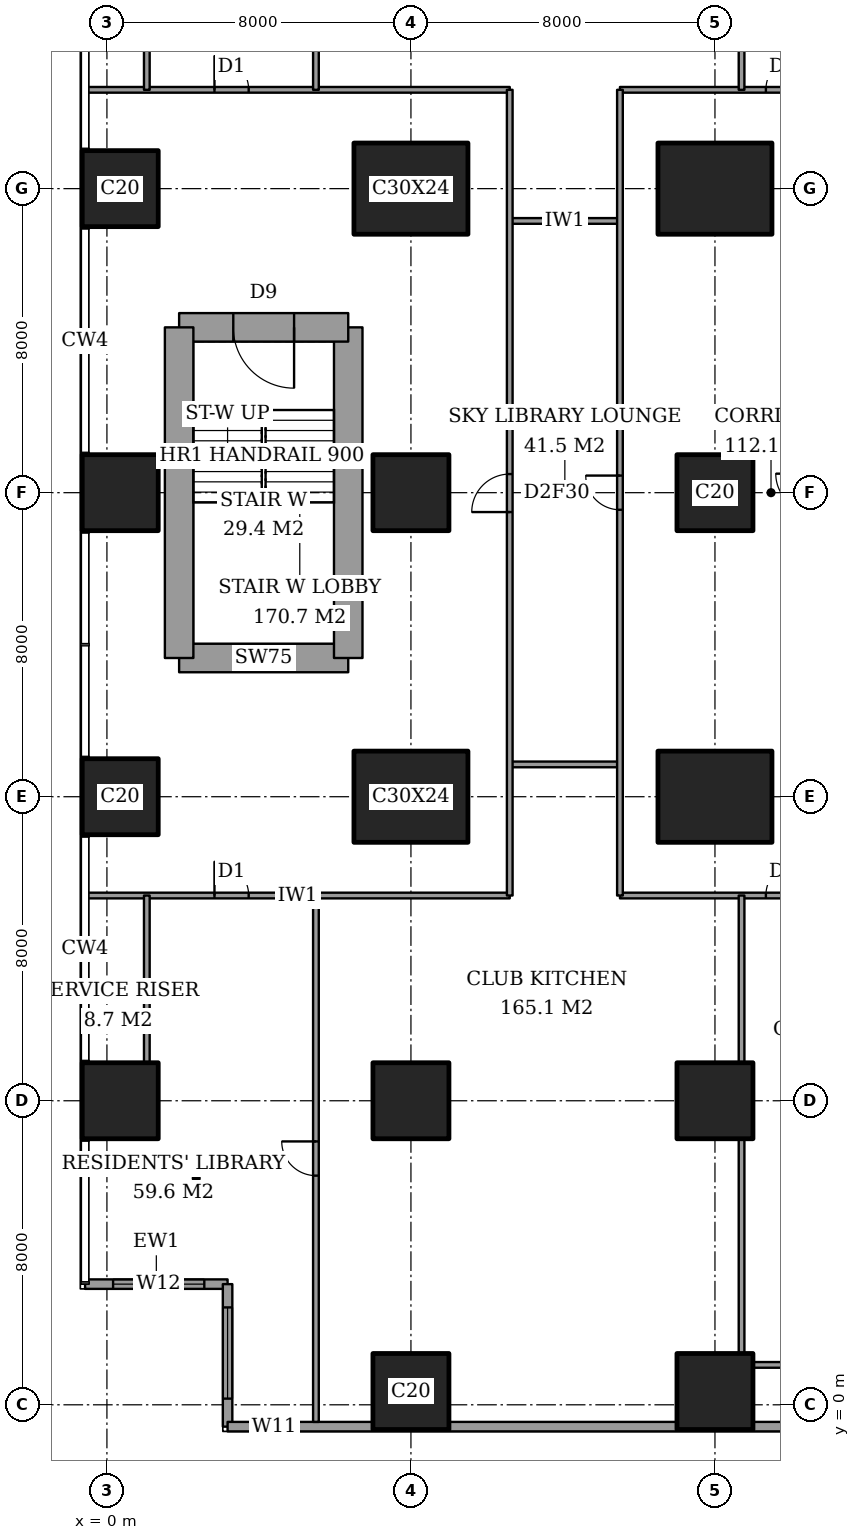
"""IFC4 building model, lengths in metres.
Left out: names, types, materials, properties, quantities, classifications, styles, units other than length and angle.
Written with IfcOpenShell. Run it as: python <this file> out.ifc"""

import sys

from ifc_helpers import new_model, si_unit, direction, frame, frame_2d, origin, origin_2d, place, context, subcontext, project, spatial, rectangle, extrude, element, fill, save


model = new_model("IFC4")
c1 = context("Model", 3, precision=1e-05, world=origin(), true_north=direction((0.0, 1.0)))
c2 = subcontext(c1, "Body", "Model", "MODEL_VIEW")
j1 = project(units=[si_unit("LENGTHUNIT", "METRE"), si_unit("PLANEANGLEUNIT", "RADIAN")], contexts=[c1])
p1 = place(None, origin())
s1 = spatial("IfcSite", under=j1, at=p1, CompositionType="ELEMENT")
p2 = place(p1, origin())
s2 = spatial("IfcBuilding", under=s1, at=p2, CompositionType="ELEMENT")
p3 = place(p2, frame((0.0, 0.0, 132.2)))
s3 = spatial("IfcBuildingStorey", under=s2, at=p3, CompositionType="ELEMENT", Elevation=132.2)
for number, where, z_axis, x_axis in (
    (1, (0.35, 8.0, 0.0), (0.0, 0.0, 1.0), (1.0, 0.0, 0.0)),
    (2, (0.35, 16.0, 0.0), (0.0, 0.0, 1.0), (1.0, 0.0, 0.0)),
    (3, (0.35, 24.0, 0.0), (0.0, 0.0, 1.0), (1.0, 0.0, 0.0)),
    (4, (0.35, 32.0, 0.0), (0.0, 0.0, 1.0), (1.0, 0.0, 0.0)),
    (5, (8.0, 0.35, 0.0), (0.0, 0.0, 1.0), (1.0, 0.0, 0.0)),
    (6, (8.0, 8.0, 0.0), (0.0, 0.0, 1.0), (1.0, 0.0, 0.0)),
):
    element("IfcColumn", number, at=place(p3, frame(where, z_axis=z_axis, x_axis=x_axis)), inside=s3, PredefinedType="COLUMN", context=c2, shape_type="SweptSolid", body=[
        extrude(rectangle(XDim=2.0, YDim=2.0, at=origin_2d()), origin(), (0.0, 0.0, 1.0), 3.6),
    ])
p4 = place(p3, frame((8.0, 16.0, 0.0), z_axis=(0.0, 0.0, 1.0), x_axis=(1.0, 0.0, 0.0)))
e7 = element("IfcColumn", 7, at=p4, inside=s3, PredefinedType="COLUMN", context=c2, shape_type="SweptSolid", body=[
    extrude(rectangle(XDim=3.0, YDim=2.4, at=origin_2d()), origin(), (0.0, 0.0, 1.0), 3.6),
])
p5 = place(p3, frame((8.0, 24.0, 0.0), z_axis=(0.0, 0.0, 1.0), x_axis=(1.0, 0.0, 0.0)))
e8 = element("IfcColumn", 8, at=p5, inside=s3, PredefinedType="COLUMN", context=c2, shape_type="SweptSolid", body=[
    extrude(rectangle(XDim=2.0, YDim=2.0, at=origin_2d()), origin(), (0.0, 0.0, 1.0), 3.6),
])
p6 = place(p3, frame((8.0, 32.0, 0.0), z_axis=(0.0, 0.0, 1.0), x_axis=(1.0, 0.0, 0.0)))
e9 = element("IfcColumn", 9, at=p6, inside=s3, PredefinedType="COLUMN", context=c2, shape_type="SweptSolid", body=[
    extrude(rectangle(XDim=3.0, YDim=2.4, at=origin_2d()), origin(), (0.0, 0.0, 1.0), 3.6),
])
for number, where, z_axis, x_axis in (
    (10, (16.0, 0.35, 0.0), (0.0, 0.0, 1.0), (1.0, 0.0, 0.0)),
    (11, (16.0, 8.0, 0.0), (0.0, 0.0, 1.0), (1.0, 0.0, 0.0)),
):
    element("IfcColumn", number, at=place(p3, frame(where, z_axis=z_axis, x_axis=x_axis)), inside=s3, PredefinedType="COLUMN", context=c2, shape_type="SweptSolid", body=[
        extrude(rectangle(XDim=2.0, YDim=2.0, at=origin_2d()), origin(), (0.0, 0.0, 1.0), 3.6),
    ])
p7 = place(p3, frame((16.0, 16.0, 0.0), z_axis=(0.0, 0.0, 1.0), x_axis=(1.0, 0.0, 0.0)))
e12 = element("IfcColumn", 12, at=p7, inside=s3, PredefinedType="COLUMN", context=c2, shape_type="SweptSolid", body=[
    extrude(rectangle(XDim=3.0, YDim=2.4, at=origin_2d()), origin(), (0.0, 0.0, 1.0), 3.6),
])
p8 = place(p3, frame((16.0, 24.0, 0.0), z_axis=(0.0, 0.0, 1.0), x_axis=(1.0, 0.0, 0.0)))
e13 = element("IfcColumn", 13, at=p8, inside=s3, PredefinedType="COLUMN", context=c2, shape_type="SweptSolid", body=[
    extrude(rectangle(XDim=2.0, YDim=2.0, at=origin_2d()), origin(), (0.0, 0.0, 1.0), 3.6),
])
p9 = place(p3, frame((16.0, 32.0, 0.0), z_axis=(0.0, 0.0, 1.0), x_axis=(1.0, 0.0, 0.0)))
e14 = element("IfcColumn", 14, at=p9, inside=s3, PredefinedType="COLUMN", context=c2, shape_type="SweptSolid", body=[
    extrude(rectangle(XDim=3.0, YDim=2.4, at=origin_2d()), origin(), (0.0, 0.0, 1.0), 3.6),
])
p10 = place(p3, frame((1.9, 19.65, 0.0), z_axis=(0.0, 0.0, 1.0), x_axis=(1.0, 0.0, 0.0)))
e15 = element("IfcWall", 15, at=p10, inside=s3, PredefinedType="SHEAR", context=c2, shape_type="SweptSolid", body=[
    extrude(rectangle(XDim=4.45, YDim=0.75, at=frame_2d((2.225, 0.0))), origin(), (0.0, 0.0, 1.0), 3.6),
])
p11 = place(p3, frame((6.35, 19.65, 0.0), z_axis=(0.0, 0.0, 1.0), x_axis=(0.0, 1.0, 0.0)))
e16 = element("IfcWall", 16, at=p11, inside=s3, PredefinedType="SHEAR", context=c2, shape_type="SweptSolid", body=[
    extrude(rectangle(XDim=8.7, YDim=0.75, at=frame_2d((4.35, 0.0))), origin(), (0.0, 0.0, 1.0), 3.6),
])
p12 = place(p3, frame((6.35, 28.35, 0.0), z_axis=(0.0, 0.0, 1.0), x_axis=(-1.0, 0.0, 0.0)))
e17 = element("IfcWall", 17, at=p12, inside=s3, PredefinedType="SHEAR", context=c2, shape_type="SweptSolid", body=[
    extrude(rectangle(XDim=4.45, YDim=0.75, at=frame_2d((2.225, 0.0))), origin(), (0.0, 0.0, 1.0), 3.6),
])
p13 = place(p12, frame((1.425, 0.0, 0.0)))
e18 = element("IfcOpeningElement", 18, at=p13, cuts=e17, PredefinedType="OPENING", context=c2, shape_type="SweptSolid", body=[
    extrude(rectangle(XDim=1.6, YDim=2.1, at=frame_2d((0.8, 1.05))), frame((0.0, 0.385, 0.0), z_axis=(0.0, -1.0, 0.0), x_axis=(1.0, 0.0, 0.0)), (0.0, 0.0, 1.0), 0.77),
])
p14 = place(p3, frame((1.9, 28.35, 0.0), z_axis=(0.0, 0.0, 1.0), x_axis=(0.0, -1.0, 0.0)))
e19 = element("IfcWall", 19, at=p14, inside=s3, PredefinedType="SHEAR", context=c2, shape_type="SweptSolid", body=[
    extrude(rectangle(XDim=8.7, YDim=0.75, at=frame_2d((4.35, 0.0))), origin(), (0.0, 0.0, 1.0), 3.6),
])
p15 = place(p3, frame((-0.575, 3.175, 0.0), z_axis=(0.0, 0.0, 1.0), x_axis=(1.0, 0.0, 0.0)))
e20 = element("IfcWall", 20, at=p15, inside=s3, PredefinedType="SOLIDWALL", context=c2, shape_type="SweptSolid", body=[
    extrude(rectangle(XDim=3.75, YDim=0.25, at=frame_2d((1.875, 0.0))), origin(), (0.0, 0.0, 1.0), 3.6),
])
p16 = place(p15, frame((0.738, 0.0, 0.4)))
e21 = element("IfcOpeningElement", 21, at=p16, cuts=e20, PredefinedType="OPENING", context=c2, shape_type="SweptSolid", body=[
    extrude(rectangle(XDim=2.4, YDim=2.2, at=frame_2d((1.2, 1.1))), frame((0.0, 0.135, 0.0), z_axis=(0.0, -1.0, 0.0), x_axis=(1.0, 0.0, 0.0)), (0.0, 0.0, 1.0), 0.27),
])
p17 = place(p3, frame((3.175, 3.175, 0.0), z_axis=(0.0, 0.0, 1.0), x_axis=(0.0, -1.0, 0.0)))
e22 = element("IfcWall", 22, at=p17, inside=s3, PredefinedType="SOLIDWALL", context=c2, shape_type="SweptSolid", body=[
    extrude(rectangle(XDim=3.75, YDim=0.25, at=frame_2d((1.875, 0.0))), origin(), (0.0, 0.0, 1.0), 3.6),
])
p18 = place(p17, frame((0.613, 0.0, 0.4)))
e23 = element("IfcOpeningElement", 23, at=p18, cuts=e22, PredefinedType="OPENING", context=c2, shape_type="SweptSolid", body=[
    extrude(rectangle(XDim=2.4, YDim=2.2, at=frame_2d((1.2, 1.1))), frame((0.0, 0.135, 0.0), z_axis=(0.0, -1.0, 0.0), x_axis=(1.0, 0.0, 0.0)), (0.0, 0.0, 1.0), 0.27),
])
p19 = place(p3, frame((3.175, -0.575, 0.0), z_axis=(0.0, 0.0, 1.0), x_axis=(1.0, 0.0, 0.0)))
e24 = element("IfcWall", 24, at=p19, inside=s3, PredefinedType="SOLIDWALL", context=c2, shape_type="SweptSolid", body=[
    extrude(rectangle(XDim=21.4, YDim=0.25, at=frame_2d((10.7, 0.0))), origin(), (0.0, 0.0, 1.0), 3.6),
])
p20 = place(p19, frame((0.625, 0.0, 0.4)))
e25 = element("IfcOpeningElement", 25, at=p20, cuts=e24, PredefinedType="OPENING", context=c2, shape_type="SweptSolid", body=[
    extrude(rectangle(XDim=1.2, YDim=2.2, at=frame_2d((0.6, 1.1))), frame((0.0, 0.135, 0.0), z_axis=(0.0, -1.0, 0.0), x_axis=(1.0, 0.0, 0.0)), (0.0, 0.0, 1.0), 0.27),
])
p21 = place(p3, frame((17.0, 1.05, 0.0), z_axis=(0.0, 0.0, 1.0), x_axis=(1.0, 0.0, 0.0)))
e26 = element("IfcWall", 26, at=p21, inside=s3, PredefinedType="PARTITIONING", context=c2, shape_type="SweptSolid", body=[
    extrude(rectangle(XDim=5.65, YDim=0.15, at=frame_2d((2.825, 0.0))), origin(), (0.0, 0.0, 1.0), 3.35),
])
p22 = place(p3, frame((-0.561, 13.4, 0.0), z_axis=(0.0, 0.0, 1.0), x_axis=(1.0, 0.0, 0.0)))
e27 = element("IfcWall", 27, at=p22, inside=s3, PredefinedType="PARTITIONING", context=c2, shape_type="SweptSolid", body=[
    extrude(rectangle(XDim=11.161, YDim=0.15, at=frame_2d((5.581, 0.0))), origin(), (0.0, 0.0, 1.0), 3.35),
])
p23 = place(p22, frame((3.391, 0.0, 0.0)))
e28 = element("IfcOpeningElement", 28, at=p23, cuts=e27, PredefinedType="OPENING", context=c2, shape_type="SweptSolid", body=[
    extrude(rectangle(XDim=0.9, YDim=2.1, at=frame_2d((0.45, 1.05))), frame((0.0, 0.085, 0.0), z_axis=(0.0, -1.0, 0.0), x_axis=(1.0, 0.0, 0.0)), (0.0, 0.0, 1.0), 0.17),
])
p24 = place(p3, frame((13.5, 13.4, 0.0), z_axis=(0.0, 0.0, 1.0), x_axis=(1.0, 0.0, 0.0)))
e29 = element("IfcWall", 29, at=p24, inside=s3, PredefinedType="PARTITIONING", context=c2, shape_type="SweptSolid", body=[
    extrude(rectangle(XDim=5.4, YDim=0.15, at=frame_2d((2.7, 0.0))), origin(), (0.0, 0.0, 1.0), 3.35),
])
p25 = place(p24, frame((3.84, 0.0, 0.0)))
e30 = element("IfcOpeningElement", 30, at=p25, cuts=e29, PredefinedType="OPENING", context=c2, shape_type="SweptSolid", body=[
    extrude(rectangle(XDim=0.9, YDim=2.1, at=frame_2d((0.45, 1.05))), frame((0.0, 0.085, 0.0), z_axis=(0.0, -1.0, 0.0), x_axis=(1.0, 0.0, 0.0)), (0.0, 0.0, 1.0), 0.17),
])
for number, where, z_axis, x_axis in (
    (31, (10.6, 16.85, 0.0), (0.0, 0.0, 1.0), (1.0, 0.0, 0.0)),
    (32, (10.6, 31.15, 0.0), (0.0, 0.0, 1.0), (1.0, 0.0, 0.0)),
):
    element("IfcWall", number, at=place(p3, frame(where, z_axis=z_axis, x_axis=x_axis)), inside=s3, PredefinedType="PARTITIONING", context=c2, shape_type="SweptSolid", body=[
        extrude(rectangle(XDim=2.9, YDim=0.15, at=frame_2d((1.45, 0.0))), origin(), (0.0, 0.0, 1.0), 3.35),
    ])
p26 = place(p3, frame((-0.561, 34.6, 0.0), z_axis=(0.0, 0.0, 1.0), x_axis=(1.0, 0.0, 0.0)))
e33 = element("IfcWall", 33, at=p26, inside=s3, PredefinedType="PARTITIONING", context=c2, shape_type="SweptSolid", body=[
    extrude(rectangle(XDim=11.161, YDim=0.15, at=frame_2d((5.581, 0.0))), origin(), (0.0, 0.0, 1.0), 3.35),
])
p27 = place(p26, frame((3.391, 0.0, 0.0)))
e34 = element("IfcOpeningElement", 34, at=p27, cuts=e33, PredefinedType="OPENING", context=c2, shape_type="SweptSolid", body=[
    extrude(rectangle(XDim=0.9, YDim=2.1, at=frame_2d((0.45, 1.05))), frame((0.0, 0.085, 0.0), z_axis=(0.0, -1.0, 0.0), x_axis=(1.0, 0.0, 0.0)), (0.0, 0.0, 1.0), 0.17),
])
p28 = place(p3, frame((13.5, 34.6, 0.0), z_axis=(0.0, 0.0, 1.0), x_axis=(1.0, 0.0, 0.0)))
e35 = element("IfcWall", 35, at=p28, inside=s3, PredefinedType="PARTITIONING", context=c2, shape_type="SweptSolid", body=[
    extrude(rectangle(XDim=5.4, YDim=0.15, at=frame_2d((2.7, 0.0))), origin(), (0.0, 0.0, 1.0), 3.35),
])
p29 = place(p28, frame((3.84, 0.0, 0.0)))
e36 = element("IfcOpeningElement", 36, at=p29, cuts=e35, PredefinedType="OPENING", context=c2, shape_type="SweptSolid", body=[
    extrude(rectangle(XDim=0.9, YDim=2.1, at=frame_2d((0.45, 1.05))), frame((0.0, 0.085, 0.0), z_axis=(0.0, -1.0, 0.0), x_axis=(1.0, 0.0, 0.0)), (0.0, 0.0, 1.0), 0.17),
])
for number, where, z_axis, x_axis in (
    (37, (1.05, 9.0, 0.0), (0.0, 0.0, 1.0), (0.0, 1.0, 0.0)),
    (38, (1.05, 34.6, 0.0), (0.0, 0.0, 1.0), (0.0, 1.0, 0.0)),
):
    element("IfcWall", number, at=place(p3, frame(where, z_axis=z_axis, x_axis=x_axis)), inside=s3, PredefinedType="PARTITIONING", context=c2, shape_type="SweptSolid", body=[
        extrude(rectangle(XDim=4.4, YDim=0.15, at=frame_2d((2.2, 0.0))), origin(), (0.0, 0.0, 1.0), 3.35),
    ])
p30 = place(p3, frame((5.5, -0.45, 0.0), z_axis=(0.0, 0.0, 1.0), x_axis=(0.0, 1.0, 0.0)))
e39 = element("IfcWall", 39, at=p30, inside=s3, PredefinedType="PARTITIONING", context=c2, shape_type="SweptSolid", body=[
    extrude(rectangle(XDim=13.85, YDim=0.15, at=frame_2d((6.925, 0.0))), origin(), (0.0, 0.0, 1.0), 3.35),
])
p31 = place(p30, frame((6.48, 0.0, 0.0)))
e40 = element("IfcOpeningElement", 40, at=p31, cuts=e39, PredefinedType="OPENING", context=c2, shape_type="SweptSolid", body=[
    extrude(rectangle(XDim=0.9, YDim=2.1, at=frame_2d((0.45, 1.05))), frame((0.0, 0.085, 0.0), z_axis=(0.0, -1.0, 0.0), x_axis=(1.0, 0.0, 0.0)), (0.0, 0.0, 1.0), 0.17),
])
p32 = place(p3, frame((5.5, 34.6, 0.0), z_axis=(0.0, 0.0, 1.0), x_axis=(0.0, 1.0, 0.0)))
e41 = element("IfcWall", 41, at=p32, inside=s3, PredefinedType="PARTITIONING", context=c2, shape_type="SweptSolid", body=[
    extrude(rectangle(XDim=13.85, YDim=0.15, at=frame_2d((6.925, 0.0))), origin(), (0.0, 0.0, 1.0), 3.35),
])
p33 = place(p32, frame((6.48, 0.0, 0.0)))
e42 = element("IfcOpeningElement", 42, at=p33, cuts=e41, PredefinedType="OPENING", context=c2, shape_type="SweptSolid", body=[
    extrude(rectangle(XDim=0.9, YDim=2.1, at=frame_2d((0.45, 1.05))), frame((0.0, 0.085, 0.0), z_axis=(0.0, -1.0, 0.0), x_axis=(1.0, 0.0, 0.0)), (0.0, 0.0, 1.0), 0.17),
])
p34 = place(p3, frame((10.6, 13.4, 0.0), z_axis=(0.0, 0.0, 1.0), x_axis=(0.0, 1.0, 0.0)))
e43 = element("IfcWall", 43, at=p34, inside=s3, PredefinedType="PARTITIONING", context=c2, shape_type="SweptSolid", body=[
    extrude(rectangle(XDim=21.2, YDim=0.15, at=frame_2d((10.6, 0.0))), origin(), (0.0, 0.0, 1.0), 3.35),
])
p35 = place(p34, frame((10.09, 0.0, 0.0)))
e44 = element("IfcOpeningElement", 44, at=p35, cuts=e43, PredefinedType="OPENING", context=c2, shape_type="SweptSolid", body=[
    extrude(rectangle(XDim=1.0, YDim=2.1, at=frame_2d((0.5, 1.05))), frame((0.0, 0.085, 0.0), z_axis=(0.0, -1.0, 0.0), x_axis=(1.0, 0.0, 0.0)), (0.0, 0.0, 1.0), 0.17),
])
p36 = place(p3, frame((13.5, 13.4, 0.0), z_axis=(0.0, 0.0, 1.0), x_axis=(0.0, 1.0, 0.0)))
e45 = element("IfcWall", 45, at=p36, inside=s3, PredefinedType="PARTITIONING", context=c2, shape_type="SweptSolid", body=[
    extrude(rectangle(XDim=21.2, YDim=0.15, at=frame_2d((10.6, 0.0))), origin(), (0.0, 0.0, 1.0), 3.35),
])
p37 = place(p36, frame((10.15, 0.0, 0.0)))
e46 = element("IfcOpeningElement", 46, at=p37, cuts=e45, PredefinedType="OPENING", context=c2, shape_type="SweptSolid", body=[
    extrude(rectangle(XDim=0.9, YDim=2.1, at=frame_2d((0.45, 1.05))), frame((0.0, 0.085, 0.0), z_axis=(0.0, -1.0, 0.0), x_axis=(1.0, 0.0, 0.0)), (0.0, 0.0, 1.0), 0.17),
])
p38 = place(p3, frame((16.7, 1.35, 0.0), z_axis=(0.0, 0.0, 1.0), x_axis=(0.0, 1.0, 0.0)))
e47 = element("IfcWall", 47, at=p38, inside=s3, PredefinedType="PARTITIONING", context=c2, shape_type="SweptSolid", body=[
    extrude(rectangle(XDim=5.65, YDim=0.15, at=frame_2d((2.825, 0.0))), origin(), (0.0, 0.0, 1.0), 3.35),
])
for number, where, z_axis, x_axis in (
    (48, (16.7, 9.0, 0.0), (0.0, 0.0, 1.0), (0.0, 1.0, 0.0)),
    (49, (16.7, 34.6, 0.0), (0.0, 0.0, 1.0), (0.0, 1.0, 0.0)),
):
    element("IfcWall", number, at=place(p3, frame(where, z_axis=z_axis, x_axis=x_axis)), inside=s3, PredefinedType="PARTITIONING", context=c2, shape_type="SweptSolid", body=[
        extrude(rectangle(XDim=4.4, YDim=0.15, at=frame_2d((2.2, 0.0))), origin(), (0.0, 0.0, 1.0), 3.35),
    ])
p39 = place(p16, origin())
e50 = element("IfcWindow", 50, at=p39, inside=s3, PartitioningType="SINGLE_PANEL", PredefinedType="WINDOW", context=c2, shape_type="SweptSolid", body=[
    extrude(rectangle(XDim=2.4, YDim=2.2, at=frame_2d((1.2, 1.1))), frame((0.0, 0.03, 0.0), z_axis=(0.0, -1.0, 0.0), x_axis=(1.0, 0.0, 0.0)), (0.0, 0.0, 1.0), 0.06),
])
fill(e21, e50)
p40 = place(p18, origin())
e51 = element("IfcWindow", 51, at=p40, inside=s3, PartitioningType="SINGLE_PANEL", PredefinedType="WINDOW", context=c2, shape_type="SweptSolid", body=[
    extrude(rectangle(XDim=2.4, YDim=2.2, at=frame_2d((1.2, 1.1))), frame((0.0, 0.03, 0.0), z_axis=(0.0, -1.0, 0.0), x_axis=(1.0, 0.0, 0.0)), (0.0, 0.0, 1.0), 0.06),
])
fill(e23, e51)
p41 = place(p20, origin())
e52 = element("IfcWindow", 52, at=p41, inside=s3, PartitioningType="SINGLE_PANEL", PredefinedType="WINDOW", context=c2, shape_type="SweptSolid", body=[
    extrude(rectangle(XDim=1.2, YDim=2.2, at=frame_2d((0.6, 1.1))), frame((0.0, 0.03, 0.0), z_axis=(0.0, -1.0, 0.0), x_axis=(1.0, 0.0, 0.0)), (0.0, 0.0, 1.0), 0.06),
])
fill(e25, e52)
p42 = place(p35, origin())
e53 = element("IfcDoor", 53, at=p42, inside=s3, OperationType="SINGLE_SWING_RIGHT", PredefinedType="DOOR", context=c2, shape_type="SweptSolid", body=[
    extrude(rectangle(XDim=1.0, YDim=2.1, at=frame_2d((0.5, 1.05))), frame((0.0, 0.025, 0.0), z_axis=(0.0, -1.0, 0.0), x_axis=(1.0, 0.0, 0.0)), (0.0, 0.0, 1.0), 0.05),
])
fill(e44, e53)
p43 = place(p37, origin())
e54 = element("IfcDoor", 54, at=p43, inside=s3, OperationType="SINGLE_SWING_LEFT", PredefinedType="DOOR", context=c2, shape_type="SweptSolid", body=[
    extrude(rectangle(XDim=0.9, YDim=2.1, at=frame_2d((0.45, 1.05))), frame((0.0, 0.025, 0.0), z_axis=(0.0, -1.0, 0.0), x_axis=(1.0, 0.0, 0.0)), (0.0, 0.0, 1.0), 0.05),
])
fill(e46, e54)
p44 = place(p23, origin())
e55 = element("IfcDoor", 55, at=p44, inside=s3, OperationType="SINGLE_SWING_RIGHT", PredefinedType="DOOR", context=c2, shape_type="SweptSolid", body=[
    extrude(rectangle(XDim=0.9, YDim=2.1, at=frame_2d((0.45, 1.05))), frame((0.0, 0.025, 0.0), z_axis=(0.0, -1.0, 0.0), x_axis=(1.0, 0.0, 0.0)), (0.0, 0.0, 1.0), 0.05),
])
fill(e28, e55)
p45 = place(p31, origin())
e56 = element("IfcDoor", 56, at=p45, inside=s3, OperationType="SINGLE_SWING_LEFT", PredefinedType="DOOR", context=c2, shape_type="SweptSolid", body=[
    extrude(rectangle(XDim=0.9, YDim=2.1, at=frame_2d((0.45, 1.05))), frame((0.0, 0.025, 0.0), z_axis=(0.0, -1.0, 0.0), x_axis=(1.0, 0.0, 0.0)), (0.0, 0.0, 1.0), 0.05),
])
fill(e40, e56)
p46 = place(p25, origin())
e57 = element("IfcDoor", 57, at=p46, inside=s3, OperationType="SINGLE_SWING_LEFT", PredefinedType="DOOR", context=c2, shape_type="SweptSolid", body=[
    extrude(rectangle(XDim=0.9, YDim=2.1, at=frame_2d((0.45, 1.05))), frame((0.0, 0.025, 0.0), z_axis=(0.0, -1.0, 0.0), x_axis=(1.0, 0.0, 0.0)), (0.0, 0.0, 1.0), 0.05),
])
fill(e30, e57)
p47 = place(p27, origin())
e58 = element("IfcDoor", 58, at=p47, inside=s3, OperationType="SINGLE_SWING_RIGHT", PredefinedType="DOOR", context=c2, shape_type="SweptSolid", body=[
    extrude(rectangle(XDim=0.9, YDim=2.1, at=frame_2d((0.45, 1.05))), frame((0.0, 0.025, 0.0), z_axis=(0.0, -1.0, 0.0), x_axis=(1.0, 0.0, 0.0)), (0.0, 0.0, 1.0), 0.05),
])
fill(e34, e58)
p48 = place(p29, origin())
e59 = element("IfcDoor", 59, at=p48, inside=s3, OperationType="SINGLE_SWING_LEFT", PredefinedType="DOOR", context=c2, shape_type="SweptSolid", body=[
    extrude(rectangle(XDim=0.9, YDim=2.1, at=frame_2d((0.45, 1.05))), frame((0.0, 0.025, 0.0), z_axis=(0.0, -1.0, 0.0), x_axis=(1.0, 0.0, 0.0)), (0.0, 0.0, 1.0), 0.05),
])
fill(e36, e59)
p49 = place(p13, origin())
e60 = element("IfcDoor", 60, at=p49, inside=s3, OperationType="DOUBLE_DOOR_SINGLE_SWING", PredefinedType="DOOR", context=c2, shape_type="SweptSolid", body=[
    extrude(rectangle(XDim=1.6, YDim=2.1, at=frame_2d((0.8, 1.05))), frame((0.0, 0.025, 0.0), z_axis=(0.0, -1.0, 0.0), x_axis=(1.0, 0.0, 0.0)), (0.0, 0.0, 1.0), 0.05),
])
fill(e18, e60)
save(model, sys.argv[1])
